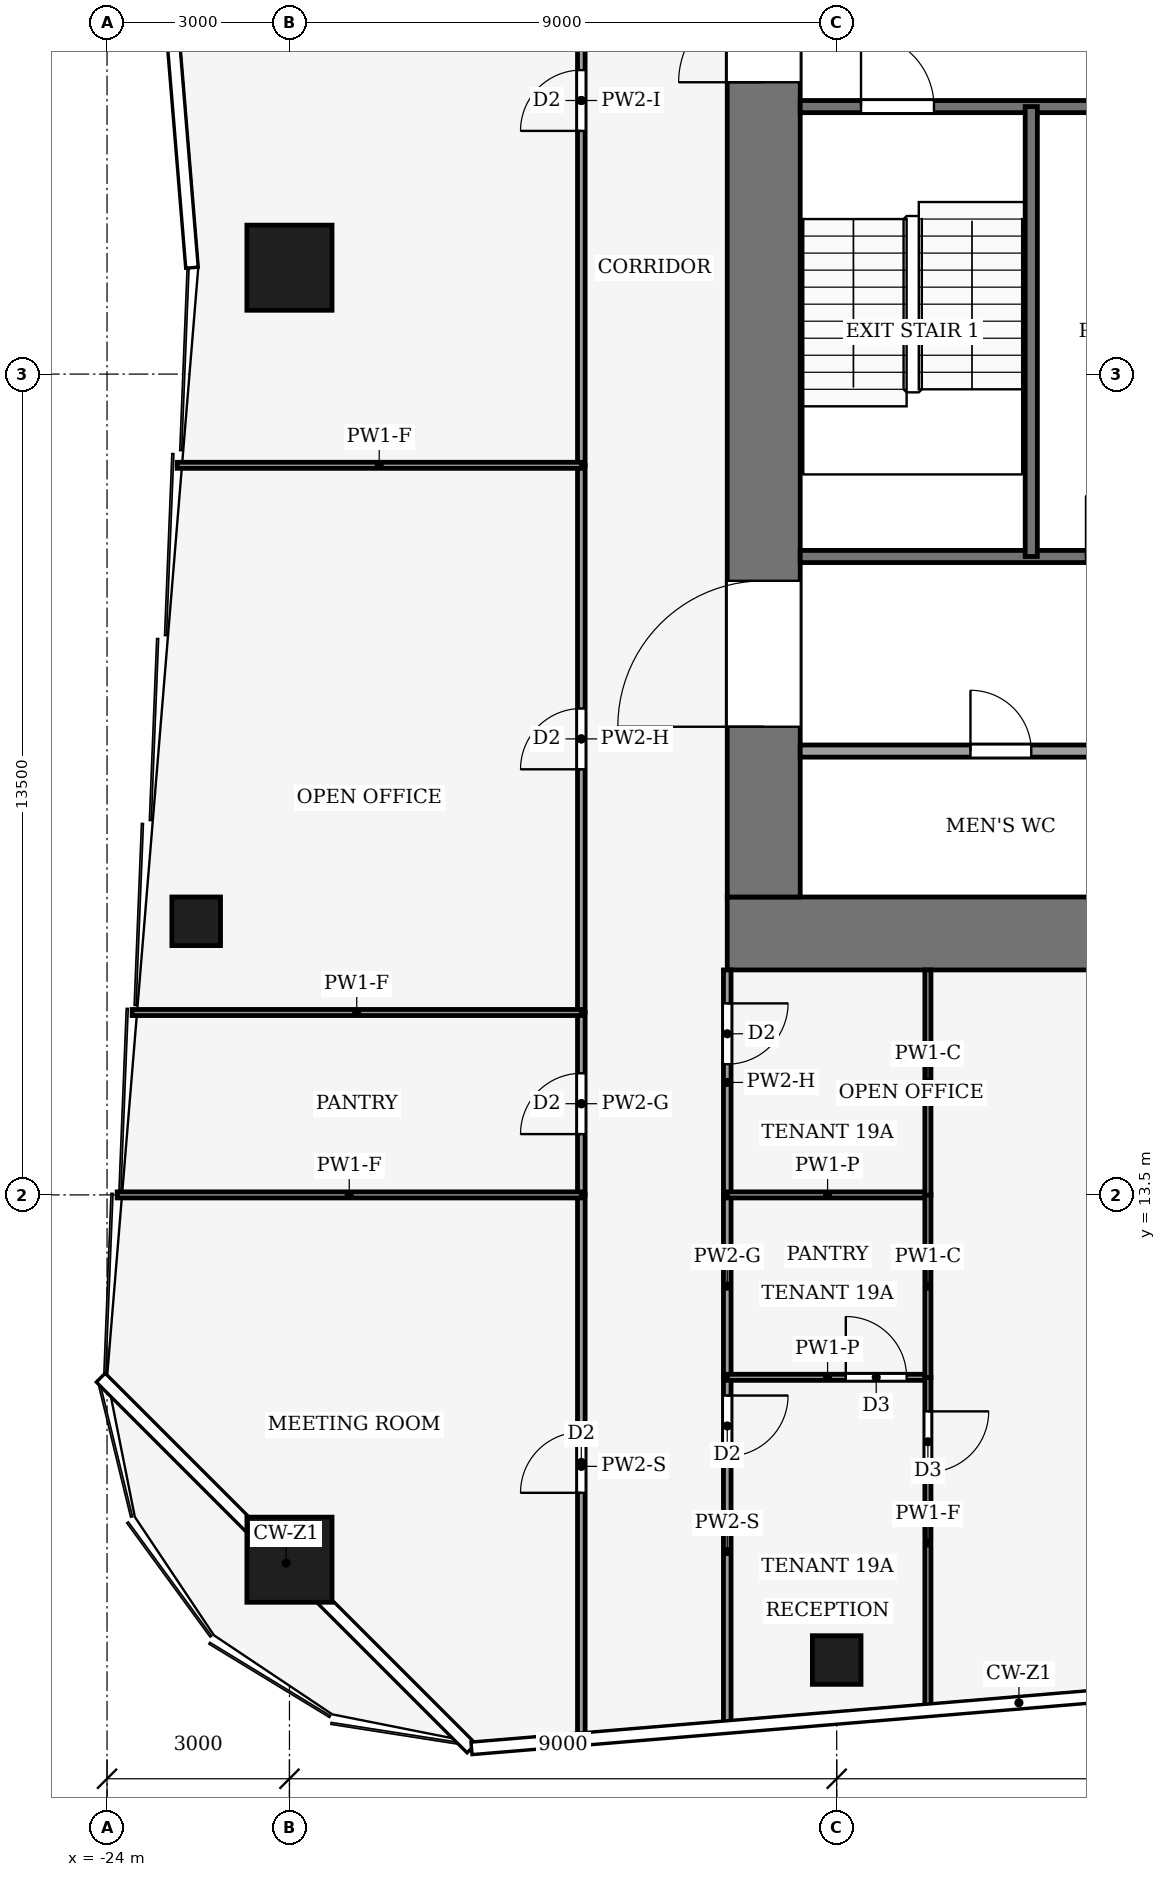
"""IFC4 building model, lengths in metres.
Left out: names, types, materials, properties, quantities, classifications, styles, units other than length and angle.
Written with IfcOpenShell. Run it as: python <this file> out.ifc"""

import sys

from ifc_helpers import new_model, si_unit, direction, frame, frame_2d, origin, origin_2d, place, context, subcontext, project, spatial, rectangle, hollow_rectangle, extrude, element, fill, save


model = new_model("IFC4")
c1 = context("Model", 3, precision=1e-05, world=origin(), true_north=direction((0.0, 1.0)))
c2 = subcontext(c1, "Body", "Model", "MODEL_VIEW")
j1 = project(units=[si_unit("LENGTHUNIT", "METRE"), si_unit("PLANEANGLEUNIT", "RADIAN")], contexts=[c1])
p1 = place(None, origin())
s1 = spatial("IfcSite", under=j1, at=p1, CompositionType="ELEMENT")
p2 = place(p1, origin())
s2 = spatial("IfcBuilding", under=s1, at=p2, CompositionType="ELEMENT")
p3 = place(p2, frame((0.0, 0.0, 86.0)))
s3 = spatial("IfcBuildingStorey", under=s2, at=p3, CompositionType="ELEMENT", Elevation=86.0)
p4 = place(p3, frame((-13.8, 17.8, -0.13), z_axis=(0.0, 0.0, 1.0), x_axis=(1.0, 0.0, 0.0)))
e1 = element("IfcWall", 1, at=p4, inside=s3, PredefinedType="SHEAR", context=c2, shape_type="SweptSolid", body=[
    extrude(rectangle(XDim=27.6, YDim=1.2, at=frame_2d((13.8, 0.0))), origin(), (0.0, 0.0, 1.0), 4.0),
])
p5 = place(p3, frame((-13.2, 18.4, -0.13), z_axis=(0.0, 0.0, 1.0), x_axis=(0.0, 1.0, 0.0)))
e2 = element("IfcWall", 2, at=p5, inside=s3, PredefinedType="SHEAR", context=c2, shape_type="SweptSolid", body=[
    extrude(rectangle(XDim=19.2, YDim=1.2, at=frame_2d((9.6, 0.0))), origin(), (0.0, 0.0, 1.0), 4.0),
])
p6 = place(p5, frame((2.8, 0.0, 0.13)))
e3 = element("IfcOpeningElement", 3, at=p6, cuts=e2, PredefinedType="OPENING", context=c2, shape_type="SweptSolid", body=[
    extrude(rectangle(XDim=2.4, YDim=2.4, at=frame_2d((1.2, 1.2))), frame((0.0, 0.61, 0.0), z_axis=(0.0, -1.0, 0.0), x_axis=(1.0, 0.0, 0.0)), (0.0, 0.0, 1.0), 1.22),
])
p7 = place(p5, frame((13.4, 0.0, 0.13)))
e4 = element("IfcOpeningElement", 4, at=p7, cuts=e2, PredefinedType="OPENING", context=c2, shape_type="SweptSolid", body=[
    extrude(rectangle(XDim=1.4, YDim=2.2, at=frame_2d((0.7, 1.1))), frame((0.0, 0.61, 0.0), z_axis=(0.0, -1.0, 0.0), x_axis=(1.0, 0.0, 0.0)), (0.0, 0.0, 1.0), 1.22),
])
for number, where, z_axis, x_axis in (
    (5, (-21.0, 7.5, 0.0), (0.0, 0.0, 1.0), (1.0, 0.0, 0.0)),
    (6, (-21.0, 28.75, 0.0), (0.0, 0.0, 1.0), (1.0, 0.0, 0.0)),
):
    element("IfcColumn", number, at=place(p3, frame(where, z_axis=z_axis, x_axis=x_axis)), inside=s3, PredefinedType="COLUMN", context=c2, shape_type="SweptSolid", body=[
        extrude(hollow_rectangle(XDim=1.4, YDim=1.4, WallThickness=0.08, at=origin_2d()), origin(), (0.0, 0.0, 1.0), 4.0),
    ])
for number, where, z_axis, x_axis in (
    (7, (-12.0, 5.85, 0.0), (0.0, 0.0, 1.0), (1.0, 0.0, 0.0)),
    (8, (-22.534, 18.0, 0.0), (0.0, 0.0, 1.0), (1.0, 0.0, 0.0)),
):
    element("IfcColumn", number, at=place(p3, frame(where, z_axis=z_axis, x_axis=x_axis)), inside=s3, PredefinedType="COLUMN", context=c2, shape_type="SweptSolid", body=[
        extrude(hollow_rectangle(XDim=0.8, YDim=0.8, WallThickness=0.04, at=origin_2d()), origin(), (0.0, 0.0, 1.0), 4.0),
    ])
p8 = place(p3, frame((-12.6, 20.8, 0.0), z_axis=(0.0, 0.0, 1.0), x_axis=(1.0, 0.0, 0.0)))
e9 = element("IfcWall", 9, at=p8, inside=s3, PredefinedType="PARTITIONING", context=c2, shape_type="SweptSolid", body=[
    extrude(rectangle(XDim=6.6, YDim=0.2, at=frame_2d((3.3, 0.0))), origin(), (0.0, 0.0, 1.0), 3.87),
])
p9 = place(p8, frame((2.8, 0.0, 0.0)))
e10 = element("IfcOpeningElement", 10, at=p9, cuts=e9, PredefinedType="OPENING", context=c2, shape_type="SweptSolid", body=[
    extrude(rectangle(XDim=1.0, YDim=2.1, at=frame_2d((0.5, 1.05))), frame((0.0, 0.11, 0.0), z_axis=(0.0, -1.0, 0.0), x_axis=(1.0, 0.0, 0.0)), (0.0, 0.0, 1.0), 0.22),
])
p10 = place(p3, frame((-12.6, 24.0, 0.0), z_axis=(0.0, 0.0, 1.0), x_axis=(1.0, 0.0, 0.0)))
e11 = element("IfcWall", 11, at=p10, inside=s3, PredefinedType="PARTITIONING", context=c2, shape_type="SweptSolid", body=[
    extrude(rectangle(XDim=6.6, YDim=0.2, at=frame_2d((3.3, 0.0))), origin(), (0.0, 0.0, 1.0), 3.87),
])
p11 = place(p10, frame((4.7, 0.0, 0.0)))
e12 = element("IfcOpeningElement", 12, at=p11, cuts=e11, PredefinedType="OPENING", context=c2, shape_type="SweptSolid", body=[
    extrude(rectangle(XDim=1.0, YDim=2.1, at=frame_2d((0.5, 1.05))), frame((0.0, 0.11, 0.0), z_axis=(0.0, -1.0, 0.0), x_axis=(1.0, 0.0, 0.0)), (0.0, 0.0, 1.0), 0.22),
])
p12 = place(p3, frame((-12.6, 31.4, 0.0), z_axis=(0.0, 0.0, 1.0), x_axis=(1.0, 0.0, 0.0)))
e13 = element("IfcWall", 13, at=p12, inside=s3, PredefinedType="PARTITIONING", context=c2, shape_type="SweptSolid", body=[
    extrude(rectangle(XDim=6.6, YDim=0.2, at=frame_2d((3.3, 0.0))), origin(), (0.0, 0.0, 1.0), 3.87),
])
p13 = place(p12, frame((1.0, 0.0, 0.0)))
e14 = element("IfcOpeningElement", 14, at=p13, cuts=e13, PredefinedType="OPENING", context=c2, shape_type="SweptSolid", body=[
    extrude(rectangle(XDim=1.2, YDim=2.2, at=frame_2d((0.6, 1.1))), frame((0.0, 0.11, 0.0), z_axis=(0.0, -1.0, 0.0), x_axis=(1.0, 0.0, 0.0)), (0.0, 0.0, 1.0), 0.22),
])
p14 = place(p3, frame((-8.8, 24.0, 0.0), z_axis=(0.0, 0.0, 1.0), x_axis=(0.0, 1.0, 0.0)))
e15 = element("IfcWall", 15, at=p14, inside=s3, PredefinedType="PARTITIONING", context=c2, shape_type="SweptSolid", body=[
    extrude(rectangle(XDim=7.4, YDim=0.2, at=frame_2d((3.7, 0.0))), origin(), (0.0, 0.0, 1.0), 3.87),
])
p15 = place(p3, frame((-16.2, 4.57, 0.0), z_axis=(0.0, 0.0, 1.0), x_axis=(0.0, 1.0, 0.0)))
e16 = element("IfcWall", 16, at=p15, inside=s3, PredefinedType="PARTITIONING", context=c2, shape_type="SweptSolid", body=[
    extrude(rectangle(XDim=8.93, YDim=0.125, at=frame_2d((4.465, 0.0))), origin(), (0.0, 0.0, 1.0), 3.04),
])
p16 = place(p15, frame((4.03, 0.0, 0.0)))
e17 = element("IfcOpeningElement", 17, at=p16, cuts=e16, PredefinedType="OPENING", context=c2, shape_type="SweptSolid", body=[
    extrude(rectangle(XDim=1.0, YDim=2.1, at=frame_2d((0.5, 1.05))), frame((0.0, 0.073, 0.0), z_axis=(0.0, -1.0, 0.0), x_axis=(1.0, 0.0, 0.0)), (0.0, 0.0, 1.0), 0.145),
])
p17 = place(p3, frame((-16.2, 13.5, 0.0), z_axis=(0.0, 0.0, 1.0), x_axis=(0.0, 1.0, 0.0)))
e18 = element("IfcWall", 18, at=p17, inside=s3, PredefinedType="PARTITIONING", context=c2, shape_type="SweptSolid", body=[
    extrude(rectangle(XDim=3.0, YDim=0.125, at=frame_2d((1.5, 0.0))), origin(), (0.0, 0.0, 1.0), 3.87),
])
p18 = place(p17, frame((1.0, 0.0, 0.0)))
e19 = element("IfcOpeningElement", 19, at=p18, cuts=e18, PredefinedType="OPENING", context=c2, shape_type="SweptSolid", body=[
    extrude(rectangle(XDim=1.0, YDim=2.1, at=frame_2d((0.5, 1.05))), frame((0.0, 0.073, 0.0), z_axis=(0.0, -1.0, 0.0), x_axis=(1.0, 0.0, 0.0)), (0.0, 0.0, 1.0), 0.145),
])
p19 = place(p3, frame((-16.2, 16.5, 0.0), z_axis=(0.0, 0.0, 1.0), x_axis=(0.0, 1.0, 0.0)))
e20 = element("IfcWall", 20, at=p19, inside=s3, PredefinedType="PARTITIONING", context=c2, shape_type="SweptSolid", body=[
    extrude(rectangle(XDim=9.0, YDim=0.125, at=frame_2d((4.5, 0.0))), origin(), (0.0, 0.0, 1.0), 3.14),
])
p20 = place(p19, frame((4.0, 0.0, 0.0)))
e21 = element("IfcOpeningElement", 21, at=p20, cuts=e20, PredefinedType="OPENING", context=c2, shape_type="SweptSolid", body=[
    extrude(rectangle(XDim=1.0, YDim=2.1, at=frame_2d((0.5, 1.05))), frame((0.0, 0.073, 0.0), z_axis=(0.0, -1.0, 0.0), x_axis=(1.0, 0.0, 0.0)), (0.0, 0.0, 1.0), 0.145),
])
p21 = place(p3, frame((-16.2, 25.5, 0.0), z_axis=(0.0, 0.0, 1.0), x_axis=(0.0, 1.0, 0.0)))
e22 = element("IfcWall", 22, at=p21, inside=s3, PredefinedType="PARTITIONING", context=c2, shape_type="SweptSolid", body=[
    extrude(rectangle(XDim=12.0, YDim=0.125, at=frame_2d((6.0, 0.0))), origin(), (0.0, 0.0, 1.0), 3.48),
])
p22 = place(p21, frame((5.5, 0.0, 0.0)))
e23 = element("IfcOpeningElement", 23, at=p22, cuts=e22, PredefinedType="OPENING", context=c2, shape_type="SweptSolid", body=[
    extrude(rectangle(XDim=1.0, YDim=2.1, at=frame_2d((0.5, 1.05))), frame((0.0, 0.073, 0.0), z_axis=(0.0, -1.0, 0.0), x_axis=(1.0, 0.0, 0.0)), (0.0, 0.0, 1.0), 0.145),
])
p23 = place(p3, frame((-13.8, 10.5, 0.0), z_axis=(0.0, 0.0, 1.0), x_axis=(0.0, -1.0, 0.0)))
e24 = element("IfcWall", 24, at=p23, inside=s3, PredefinedType="PARTITIONING", context=c2, shape_type="SweptSolid", body=[
    extrude(rectangle(XDim=5.73, YDim=0.125, at=frame_2d((2.865, 0.0))), origin(), (0.0, 0.0, 1.0), 3.04),
])
p24 = place(p23, frame((0.3, 0.0, 0.0)))
e25 = element("IfcOpeningElement", 25, at=p24, cuts=e24, PredefinedType="OPENING", context=c2, shape_type="SweptSolid", body=[
    extrude(rectangle(XDim=1.0, YDim=2.1, at=frame_2d((0.5, 1.05))), frame((0.0, 0.073, 0.0), z_axis=(0.0, -1.0, 0.0), x_axis=(1.0, 0.0, 0.0)), (0.0, 0.0, 1.0), 0.145),
])
p25 = place(p3, frame((-13.8, 10.5, 0.0), z_axis=(0.0, 0.0, 1.0), x_axis=(0.0, 1.0, 0.0)))
e26 = element("IfcWall", 26, at=p25, inside=s3, PredefinedType="PARTITIONING", context=c2, shape_type="SweptSolid", body=[
    extrude(rectangle(XDim=3.0, YDim=0.125, at=frame_2d((1.5, 0.0))), origin(), (0.0, 0.0, 1.0), 3.87),
])
p26 = place(p3, frame((-13.8, 17.2, 0.0), z_axis=(0.0, 0.0, 1.0), x_axis=(0.0, -1.0, 0.0)))
e27 = element("IfcWall", 27, at=p26, inside=s3, PredefinedType="PARTITIONING", context=c2, shape_type="SweptSolid", body=[
    extrude(rectangle(XDim=3.7, YDim=0.125, at=frame_2d((1.85, 0.0))), origin(), (0.0, 0.0, 1.0), 3.14),
])
p27 = place(p26, frame((0.55, 0.0, 0.0)))
e28 = element("IfcOpeningElement", 28, at=p27, cuts=e27, PredefinedType="OPENING", context=c2, shape_type="SweptSolid", body=[
    extrude(rectangle(XDim=1.0, YDim=2.1, at=frame_2d((0.5, 1.05))), frame((0.0, 0.073, 0.0), z_axis=(0.0, -1.0, 0.0), x_axis=(1.0, 0.0, 0.0)), (0.0, 0.0, 1.0), 0.145),
])
p28 = place(p3, frame((-16.2, 13.5, 0.0), z_axis=(0.0, 0.0, 1.0), x_axis=(-1.0, 0.0, 0.0)))
e29 = element("IfcWall", 29, at=p28, inside=s3, PredefinedType="PARTITIONING", context=c2, shape_type="SweptSolid", body=[
    extrude(rectangle(XDim=7.634, YDim=0.1, at=frame_2d((3.817, 0.0))), origin(), (0.0, 0.0, 1.0), 3.04),
])
p29 = place(p3, frame((-16.2, 16.5, 0.0), z_axis=(0.0, 0.0, 1.0), x_axis=(-1.0, 0.0, 0.0)))
e30 = element("IfcWall", 30, at=p29, inside=s3, PredefinedType="PARTITIONING", context=c2, shape_type="SweptSolid", body=[
    extrude(rectangle(XDim=7.387, YDim=0.1, at=frame_2d((3.693, 0.0))), origin(), (0.0, 0.0, 1.0), 3.04),
])
p30 = place(p3, frame((-16.2, 25.5, 0.0), z_axis=(0.0, 0.0, 1.0), x_axis=(-1.0, 0.0, 0.0)))
e31 = element("IfcWall", 31, at=p30, inside=s3, PredefinedType="PARTITIONING", context=c2, shape_type="SweptSolid", body=[
    extrude(rectangle(XDim=6.647, YDim=0.1, at=frame_2d((3.324, 0.0))), origin(), (0.0, 0.0, 1.0), 3.04),
])
p31 = place(p3, frame((-13.8, 10.5, 0.0), z_axis=(0.0, 0.0, 1.0), x_axis=(1.0, 0.0, 0.0)))
e32 = element("IfcWall", 32, at=p31, inside=s3, PredefinedType="PARTITIONING", context=c2, shape_type="SweptSolid", body=[
    extrude(rectangle(XDim=3.3, YDim=0.1, at=frame_2d((1.65, 0.0))), origin(), (0.0, 0.0, 1.0), 3.44),
])
p32 = place(p31, frame((1.95, 0.0, 0.0)))
e33 = element("IfcOpeningElement", 33, at=p32, cuts=e32, PredefinedType="OPENING", context=c2, shape_type="SweptSolid", body=[
    extrude(rectangle(XDim=1.0, YDim=2.1, at=frame_2d((0.5, 1.05))), frame((0.0, 0.06, 0.0), z_axis=(0.0, -1.0, 0.0), x_axis=(1.0, 0.0, 0.0)), (0.0, 0.0, 1.0), 0.12),
])
p33 = place(p3, frame((-10.5, 10.504, 0.0), z_axis=(0.0, 0.0, 1.0), x_axis=(0.0, -1.0, 0.0)))
e34 = element("IfcWall", 34, at=p33, inside=s3, PredefinedType="PARTITIONING", context=c2, shape_type="SweptSolid", body=[
    extrude(rectangle(XDim=5.459, YDim=0.1, at=frame_2d((2.729, 0.0))), origin(), (0.0, 0.0, 1.0), 3.04),
])
p34 = place(p33, frame((0.564, 0.0, 0.0)))
e35 = element("IfcOpeningElement", 35, at=p34, cuts=e34, PredefinedType="OPENING", context=c2, shape_type="SweptSolid", body=[
    extrude(rectangle(XDim=1.0, YDim=2.1, at=frame_2d((0.5, 1.05))), frame((0.0, 0.06, 0.0), z_axis=(0.0, -1.0, 0.0), x_axis=(1.0, 0.0, 0.0)), (0.0, 0.0, 1.0), 0.12),
])
p35 = place(p3, frame((-10.5, 13.5, 0.0), z_axis=(0.0, 0.0, 1.0), x_axis=(-1.0, 0.0, 0.0)))
e36 = element("IfcWall", 36, at=p35, inside=s3, PredefinedType="PARTITIONING", context=c2, shape_type="SweptSolid", body=[
    extrude(rectangle(XDim=3.3, YDim=0.1, at=frame_2d((1.65, 0.0))), origin(), (0.0, 0.0, 1.0), 3.44),
])
p36 = place(p3, frame((-10.5, 10.496, 0.0), z_axis=(0.0, 0.0, 1.0), x_axis=(0.0, 1.0, 0.0)))
e37 = element("IfcWall", 37, at=p36, inside=s3, PredefinedType="PARTITIONING", context=c2, shape_type="SweptSolid", body=[
    extrude(rectangle(XDim=3.008, YDim=0.1, at=frame_2d((1.504, 0.0))), origin(), (0.0, 0.0, 1.0), 3.87),
])
p37 = place(p3, frame((-10.5, 13.496, 0.0), z_axis=(0.0, 0.0, 1.0), x_axis=(0.0, 1.0, 0.0)))
e38 = element("IfcWall", 38, at=p37, inside=s3, PredefinedType="PARTITIONING", context=c2, shape_type="SweptSolid", body=[
    extrude(rectangle(XDim=3.704, YDim=0.1, at=frame_2d((1.852, 0.0))), origin(), (0.0, 0.0, 1.0), 3.87),
])
p38 = place(p9, origin())
e39 = element("IfcDoor", 39, at=p38, inside=s3, OperationType="SINGLE_SWING_LEFT", PredefinedType="DOOR", context=c2, shape_type="SweptSolid", body=[
    extrude(rectangle(XDim=1.0, YDim=2.1, at=frame_2d((0.5, 1.05))), frame((0.0, 0.025, 0.0), z_axis=(0.0, -1.0, 0.0), x_axis=(1.0, 0.0, 0.0)), (0.0, 0.0, 1.0), 0.05),
])
fill(e10, e39)
p39 = place(p11, origin())
e40 = element("IfcDoor", 40, at=p39, inside=s3, OperationType="SINGLE_SWING_RIGHT", PredefinedType="DOOR", context=c2, shape_type="SweptSolid", body=[
    extrude(rectangle(XDim=1.0, YDim=2.1, at=frame_2d((0.5, 1.05))), frame((0.0, 0.025, 0.0), z_axis=(0.0, -1.0, 0.0), x_axis=(1.0, 0.0, 0.0)), (0.0, 0.0, 1.0), 0.05),
])
fill(e12, e40)
p40 = place(p13, origin())
e41 = element("IfcDoor", 41, at=p40, inside=s3, OperationType="SINGLE_SWING_RIGHT", PredefinedType="DOOR", context=c2, shape_type="SweptSolid", body=[
    extrude(rectangle(XDim=1.2, YDim=2.2, at=frame_2d((0.6, 1.1))), frame((0.0, 0.025, 0.0), z_axis=(0.0, -1.0, 0.0), x_axis=(1.0, 0.0, 0.0)), (0.0, 0.0, 1.0), 0.05),
])
fill(e14, e41)
p41 = place(p6, origin())
e42 = element("IfcDoor", 42, at=p41, inside=s3, OperationType="DOUBLE_DOOR_SINGLE_SWING", PredefinedType="DOOR", context=c2, shape_type="SweptSolid", body=[
    extrude(rectangle(XDim=2.4, YDim=2.4, at=frame_2d((1.2, 1.2))), frame((0.0, 0.025, 0.0), z_axis=(0.0, -1.0, 0.0), x_axis=(1.0, 0.0, 0.0)), (0.0, 0.0, 1.0), 0.05),
])
fill(e3, e42)
p42 = place(p7, origin())
e43 = element("IfcDoor", 43, at=p42, inside=s3, OperationType="SINGLE_SWING_RIGHT", PredefinedType="DOOR", context=c2, shape_type="SweptSolid", body=[
    extrude(rectangle(XDim=1.4, YDim=2.2, at=frame_2d((0.7, 1.1))), frame((0.0, 0.025, 0.0), z_axis=(0.0, -1.0, 0.0), x_axis=(1.0, 0.0, 0.0)), (0.0, 0.0, 1.0), 0.05),
])
fill(e4, e43)
p43 = place(p16, origin())
e44 = element("IfcDoor", 44, at=p43, inside=s3, OperationType="SINGLE_SWING_RIGHT", PredefinedType="DOOR", context=c2, shape_type="SweptSolid", body=[
    extrude(rectangle(XDim=1.0, YDim=2.1, at=frame_2d((0.5, 1.05))), frame((0.0, 0.025, 0.0), z_axis=(0.0, -1.0, 0.0), x_axis=(1.0, 0.0, 0.0)), (0.0, 0.0, 1.0), 0.05),
])
fill(e17, e44)
p44 = place(p18, origin())
e45 = element("IfcDoor", 45, at=p44, inside=s3, OperationType="SINGLE_SWING_RIGHT", PredefinedType="DOOR", context=c2, shape_type="SweptSolid", body=[
    extrude(rectangle(XDim=1.0, YDim=2.1, at=frame_2d((0.5, 1.05))), frame((0.0, 0.025, 0.0), z_axis=(0.0, -1.0, 0.0), x_axis=(1.0, 0.0, 0.0)), (0.0, 0.0, 1.0), 0.05),
])
fill(e19, e45)
p45 = place(p20, origin())
e46 = element("IfcDoor", 46, at=p45, inside=s3, OperationType="SINGLE_SWING_LEFT", PredefinedType="DOOR", context=c2, shape_type="SweptSolid", body=[
    extrude(rectangle(XDim=1.0, YDim=2.1, at=frame_2d((0.5, 1.05))), frame((0.0, 0.025, 0.0), z_axis=(0.0, -1.0, 0.0), x_axis=(1.0, 0.0, 0.0)), (0.0, 0.0, 1.0), 0.05),
])
fill(e21, e46)
p46 = place(p22, origin())
e47 = element("IfcDoor", 47, at=p46, inside=s3, OperationType="SINGLE_SWING_RIGHT", PredefinedType="DOOR", context=c2, shape_type="SweptSolid", body=[
    extrude(rectangle(XDim=1.0, YDim=2.1, at=frame_2d((0.5, 1.05))), frame((0.0, 0.025, 0.0), z_axis=(0.0, -1.0, 0.0), x_axis=(1.0, 0.0, 0.0)), (0.0, 0.0, 1.0), 0.05),
])
fill(e23, e47)
p47 = place(p24, origin())
e48 = element("IfcDoor", 48, at=p47, inside=s3, OperationType="SINGLE_SWING_LEFT", PredefinedType="DOOR", context=c2, shape_type="SweptSolid", body=[
    extrude(rectangle(XDim=1.0, YDim=2.1, at=frame_2d((0.5, 1.05))), frame((0.0, 0.025, 0.0), z_axis=(0.0, -1.0, 0.0), x_axis=(1.0, 0.0, 0.0)), (0.0, 0.0, 1.0), 0.05),
])
fill(e25, e48)
p48 = place(p27, origin())
e49 = element("IfcDoor", 49, at=p48, inside=s3, OperationType="SINGLE_SWING_LEFT", PredefinedType="DOOR", context=c2, shape_type="SweptSolid", body=[
    extrude(rectangle(XDim=1.0, YDim=2.1, at=frame_2d((0.5, 1.05))), frame((0.0, 0.025, 0.0), z_axis=(0.0, -1.0, 0.0), x_axis=(1.0, 0.0, 0.0)), (0.0, 0.0, 1.0), 0.05),
])
fill(e28, e49)
p49 = place(p32, origin())
e50 = element("IfcDoor", 50, at=p49, inside=s3, OperationType="SINGLE_SWING_RIGHT", PredefinedType="DOOR", context=c2, shape_type="SweptSolid", body=[
    extrude(rectangle(XDim=1.0, YDim=2.1, at=frame_2d((0.5, 1.05))), frame((0.0, 0.025, 0.0), z_axis=(0.0, -1.0, 0.0), x_axis=(1.0, 0.0, 0.0)), (0.0, 0.0, 1.0), 0.05),
])
fill(e33, e50)
p50 = place(p34, origin())
e51 = element("IfcDoor", 51, at=p50, inside=s3, OperationType="SINGLE_SWING_LEFT", PredefinedType="DOOR", context=c2, shape_type="SweptSolid", body=[
    extrude(rectangle(XDim=1.0, YDim=2.1, at=frame_2d((0.5, 1.05))), frame((0.0, 0.025, 0.0), z_axis=(0.0, -1.0, 0.0), x_axis=(1.0, 0.0, 0.0)), (0.0, 0.0, 1.0), 0.05),
])
fill(e35, e51)
save(model, sys.argv[1])
